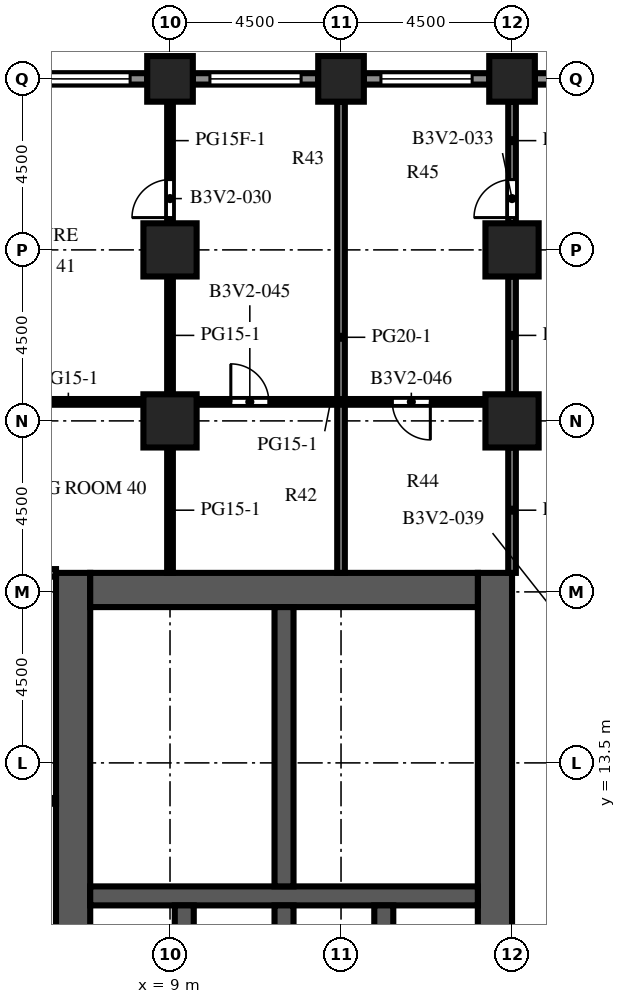
"""IFC4 building model, lengths in metres.
Left out: names, types, materials, properties, quantities, classifications, styles, units other than length and angle.
Written with IfcOpenShell. Run it as: python <this file> out.ifc"""

import sys

from ifc_helpers import new_model, si_unit, direction, frame, frame_2d, origin, origin_2d, place, context, subcontext, project, spatial, rectangle, extrude, element, fill, save


model = new_model("IFC4")
c1 = context("Model", 3, precision=1e-05, world=origin(), true_north=direction((0.0, 1.0)))
c2 = subcontext(c1, "Body", "Model", "MODEL_VIEW")
j1 = project(units=[si_unit("LENGTHUNIT", "METRE"), si_unit("PLANEANGLEUNIT", "RADIAN")], contexts=[c1])
p1 = place(None, origin())
s1 = spatial("IfcSite", under=j1, at=p1, CompositionType="ELEMENT")
p2 = place(p1, origin())
s2 = spatial("IfcBuilding", under=s1, at=p2, CompositionType="ELEMENT")
p3 = place(p2, frame((0.0, 0.0, 102.5)))
s3 = spatial("IfcBuildingStorey", under=s2, at=p3, CompositionType="ELEMENT", Elevation=102.5)
for number, where, z_axis, x_axis in (
    (1, (9.0, 31.5, 0.0), (0.0, 0.0, 1.0), (1.0, 0.0, 0.0)),
    (2, (13.5, 31.5, 0.0), (0.0, 0.0, 1.0), (1.0, 0.0, 0.0)),
    (3, (18.0, 31.5, 0.0), (0.0, 0.0, 1.0), (1.0, 0.0, 0.0)),
):
    element("IfcColumn", number, at=place(p3, frame(where, z_axis=z_axis, x_axis=x_axis)), inside=s3, PredefinedType="COLUMN", context=c2, shape_type="SweptSolid", body=[
        extrude(rectangle(XDim=1.2, YDim=1.2, at=origin_2d()), origin(), (0.0, 0.0, 1.0), 4.1),
    ])
for number, where, z_axis, x_axis in (
    (4, (9.0, 22.5, 0.0), (0.0, 0.0, 1.0), (1.0, 0.0, 0.0)),
    (5, (9.0, 27.0, 0.0), (0.0, 0.0, 1.0), (1.0, 0.0, 0.0)),
    (6, (18.0, 22.5, 0.0), (0.0, 0.0, 1.0), (1.0, 0.0, 0.0)),
    (7, (18.0, 27.0, 0.0), (0.0, 0.0, 1.0), (1.0, 0.0, 0.0)),
):
    element("IfcColumn", number, at=place(p3, frame(where, z_axis=z_axis, x_axis=x_axis)), inside=s3, PredefinedType="COLUMN", context=c2, shape_type="SweptSolid", body=[
        extrude(rectangle(XDim=1.4, YDim=1.4, at=origin_2d()), origin(), (0.0, 0.0, 1.0), 4.1),
    ])
p4 = place(p3, frame((6.45, -9.0, 0.0), z_axis=(0.0, 0.0, 1.0), x_axis=(0.0, 1.0, 0.0)))
e8 = element("IfcWall", 8, at=p4, inside=s3, PredefinedType="SHEAR", context=c2, shape_type="SweptSolid", body=[
    extrude(rectangle(XDim=27.5, YDim=0.9, at=frame_2d((13.75, 0.0))), origin(), (0.0, 0.0, 1.0), 4.1),
])
p5 = place(p4, frame((12.55, 0.0, 0.0)))
e9 = element("IfcOpeningElement", 9, at=p5, cuts=e8, PredefinedType="OPENING", context=c2, shape_type="SweptSolid", body=[
    extrude(rectangle(XDim=2.4, YDim=2.4, at=frame_2d((1.2, 1.2))), frame((0.0, 0.46, 0.0), z_axis=(0.0, -1.0, 0.0), x_axis=(1.0, 0.0, 0.0)), (0.0, 0.0, 1.0), 0.92),
])
p6 = place(p4, frame((3.893, 0.0, 0.0)))
e10 = element("IfcOpeningElement", 10, at=p6, cuts=e8, PredefinedType="OPENING", context=c2, shape_type="SweptSolid", body=[
    extrude(rectangle(XDim=0.923, YDim=2.1, at=frame_2d((0.461, 1.05))), frame((0.0, 0.46, 0.0), z_axis=(0.0, -1.0, 0.0), x_axis=(1.0, 0.0, 0.0)), (0.0, 0.0, 1.0), 0.92),
])
p7 = place(p4, frame((23.427, 0.0, 0.0)))
e11 = element("IfcOpeningElement", 11, at=p7, cuts=e8, PredefinedType="OPENING", context=c2, shape_type="SweptSolid", body=[
    extrude(rectangle(XDim=1.2, YDim=2.1, at=frame_2d((0.6, 1.05))), frame((0.0, 0.46, 0.0), z_axis=(0.0, -1.0, 0.0), x_axis=(1.0, 0.0, 0.0)), (0.0, 0.0, 1.0), 0.92),
])
p8 = place(p3, frame((17.55, -9.0, 0.0), z_axis=(0.0, 0.0, 1.0), x_axis=(0.0, 1.0, 0.0)))
e12 = element("IfcWall", 12, at=p8, inside=s3, PredefinedType="SHEAR", context=c2, shape_type="SweptSolid", body=[
    extrude(rectangle(XDim=27.5, YDim=0.9, at=frame_2d((13.75, 0.0))), origin(), (0.0, 0.0, 1.0), 4.1),
])
p9 = place(p8, frame((12.55, 0.0, 0.0)))
e13 = element("IfcOpeningElement", 13, at=p9, cuts=e12, PredefinedType="OPENING", context=c2, shape_type="SweptSolid", body=[
    extrude(rectangle(XDim=2.4, YDim=2.4, at=frame_2d((1.2, 1.2))), frame((0.0, 0.46, 0.0), z_axis=(0.0, -1.0, 0.0), x_axis=(1.0, 0.0, 0.0)), (0.0, 0.0, 1.0), 0.92),
])
p10 = place(p8, frame((6.825, 0.0, 0.0)))
e14 = element("IfcOpeningElement", 14, at=p10, cuts=e12, PredefinedType="OPENING", context=c2, shape_type="SweptSolid", body=[
    extrude(rectangle(XDim=1.2, YDim=2.1, at=frame_2d((0.6, 1.05))), frame((0.0, 0.46, 0.0), z_axis=(0.0, -1.0, 0.0), x_axis=(1.0, 0.0, 0.0)), (0.0, 0.0, 1.0), 0.92),
])
p11 = place(p8, frame((19.475, 0.0, 0.0)))
e15 = element("IfcOpeningElement", 15, at=p11, cuts=e12, PredefinedType="OPENING", context=c2, shape_type="SweptSolid", body=[
    extrude(rectangle(XDim=1.2, YDim=2.1, at=frame_2d((0.6, 1.05))), frame((0.0, 0.46, 0.0), z_axis=(0.0, -1.0, 0.0), x_axis=(1.0, 0.0, 0.0)), (0.0, 0.0, 1.0), 0.92),
])
p12 = place(p3, frame((6.9, 18.05, 0.0), z_axis=(0.0, 0.0, 1.0), x_axis=(1.0, 0.0, 0.0)))
e16 = element("IfcWall", 16, at=p12, inside=s3, PredefinedType="SHEAR", context=c2, shape_type="SweptSolid", body=[
    extrude(rectangle(XDim=10.2, YDim=0.9, at=frame_2d((5.1, 0.0))), origin(), (0.0, 0.0, 1.0), 4.1),
])
p13 = place(p3, frame((6.9, 10.0, 0.0), z_axis=(0.0, 0.0, 1.0), x_axis=(1.0, 0.0, 0.0)))
e17 = element("IfcWall", 17, at=p13, inside=s3, PredefinedType="SHEAR", context=c2, shape_type="SweptSolid", body=[
    extrude(rectangle(XDim=10.2, YDim=0.5, at=frame_2d((5.1, 0.0))), origin(), (0.0, 0.0, 1.0), 4.1),
])
for number, where, z_axis, x_axis in (
    (18, (9.375, 6.95, 0.0), (0.0, 0.0, 1.0), (0.0, 1.0, 0.0)),
    (19, (12.0, 6.95, 0.0), (0.0, 0.0, 1.0), (0.0, 1.0, 0.0)),
    (20, (14.625, 6.95, 0.0), (0.0, 0.0, 1.0), (0.0, 1.0, 0.0)),
):
    element("IfcWall", number, at=place(p3, frame(where, z_axis=z_axis, x_axis=x_axis)), inside=s3, PredefinedType="SHEAR", context=c2, shape_type="SweptSolid", body=[
        extrude(rectangle(XDim=2.8, YDim=0.5, at=frame_2d((1.4, 0.0))), origin(), (0.0, 0.0, 1.0), 4.1),
    ])
p14 = place(p3, frame((12.0, 10.25, 0.0), z_axis=(0.0, 0.0, 1.0), x_axis=(0.0, 1.0, 0.0)))
e21 = element("IfcWall", 21, at=p14, inside=s3, PredefinedType="SHEAR", context=c2, shape_type="SweptSolid", body=[
    extrude(rectangle(XDim=7.35, YDim=0.5, at=frame_2d((3.675, 0.0))), origin(), (0.0, 0.0, 1.0), 4.1),
])
p15 = place(p3, frame((18.6, 31.5, 0.0), z_axis=(0.0, 0.0, 1.0), x_axis=(1.0, 0.0, 0.0)))
e22 = element("IfcWall", 22, at=p15, inside=s3, PredefinedType="SOLIDWALL", context=c2, shape_type="SweptSolid", body=[
    extrude(rectangle(XDim=3.3, YDim=0.3, at=frame_2d((1.65, 0.0))), origin(), (0.0, 0.0, 1.0), 2.75),
])
p16 = place(p15, frame((1.15, 0.0, 0.0)))
e23 = element("IfcOpeningElement", 23, at=p16, cuts=e22, PredefinedType="OPENING", context=c2, shape_type="SweptSolid", body=[
    extrude(rectangle(XDim=1.0, YDim=2.2, at=frame_2d((0.5, 1.1))), frame((0.0, 0.16, 0.0), z_axis=(0.0, -1.0, 0.0), x_axis=(1.0, 0.0, 0.0)), (0.0, 0.0, 1.0), 0.32),
])
p17 = place(p3, frame((14.1, 31.5, 0.0), z_axis=(0.0, 0.0, 1.0), x_axis=(1.0, 0.0, 0.0)))
e24 = element("IfcWall", 24, at=p17, inside=s3, PredefinedType="SOLIDWALL", context=c2, shape_type="SweptSolid", body=[
    extrude(rectangle(XDim=3.3, YDim=0.3, at=frame_2d((1.65, 0.0))), origin(), (0.0, 0.0, 1.0), 2.75),
])
p18 = place(p17, frame((0.45, 0.0, 0.8)))
e25 = element("IfcOpeningElement", 25, at=p18, cuts=e24, PredefinedType="OPENING", context=c2, shape_type="SweptSolid", body=[
    extrude(rectangle(XDim=2.4, YDim=1.7, at=frame_2d((1.2, 0.85))), frame((0.0, 0.16, 0.0), z_axis=(0.0, -1.0, 0.0), x_axis=(1.0, 0.0, 0.0)), (0.0, 0.0, 1.0), 0.32),
])
p19 = place(p3, frame((9.6, 31.5, 0.0), z_axis=(0.0, 0.0, 1.0), x_axis=(1.0, 0.0, 0.0)))
e26 = element("IfcWall", 26, at=p19, inside=s3, PredefinedType="SOLIDWALL", context=c2, shape_type="SweptSolid", body=[
    extrude(rectangle(XDim=3.3, YDim=0.3, at=frame_2d((1.65, 0.0))), origin(), (0.0, 0.0, 1.0), 2.75),
])
p20 = place(p19, frame((0.45, 0.0, 0.8)))
e27 = element("IfcOpeningElement", 27, at=p20, cuts=e26, PredefinedType="OPENING", context=c2, shape_type="SweptSolid", body=[
    extrude(rectangle(XDim=2.4, YDim=1.7, at=frame_2d((1.2, 0.85))), frame((0.0, 0.16, 0.0), z_axis=(0.0, -1.0, 0.0), x_axis=(1.0, 0.0, 0.0)), (0.0, 0.0, 1.0), 0.32),
])
p21 = place(p3, frame((5.1, 31.5, 0.0), z_axis=(0.0, 0.0, 1.0), x_axis=(1.0, 0.0, 0.0)))
e28 = element("IfcWall", 28, at=p21, inside=s3, PredefinedType="SOLIDWALL", context=c2, shape_type="SweptSolid", body=[
    extrude(rectangle(XDim=3.3, YDim=0.3, at=frame_2d((1.65, 0.0))), origin(), (0.0, 0.0, 1.0), 2.75),
])
p22 = place(p21, frame((0.45, 0.0, 0.8)))
e29 = element("IfcOpeningElement", 29, at=p22, cuts=e28, PredefinedType="OPENING", context=c2, shape_type="SweptSolid", body=[
    extrude(rectangle(XDim=2.4, YDim=1.7, at=frame_2d((1.2, 0.85))), frame((0.0, 0.16, 0.0), z_axis=(0.0, -1.0, 0.0), x_axis=(1.0, 0.0, 0.0)), (0.0, 0.0, 1.0), 0.32),
])
p23 = place(p3, frame((6.9, 12.455, 0.0), z_axis=(0.0, 0.0, 1.0), x_axis=(1.0, 0.0, 0.0)))
e30 = element("IfcWall", 30, at=p23, inside=s3, PredefinedType="PARTITIONING", context=c2, shape_type="SweptSolid", body=[
    extrude(rectangle(XDim=1.3, YDim=0.1, at=frame_2d((0.65, 0.0))), origin(), (0.0, 0.0, 1.0), 3.65),
])
p24 = place(p23, frame((0.2, 0.0, 0.0)))
e31 = element("IfcOpeningElement", 31, at=p24, cuts=e30, PredefinedType="OPENING", context=c2, shape_type="SweptSolid", body=[
    extrude(rectangle(XDim=0.9, YDim=2.1, at=frame_2d((0.45, 1.05))), frame((0.0, 0.06, 0.0), z_axis=(0.0, -1.0, 0.0), x_axis=(1.0, 0.0, 0.0)), (0.0, 0.0, 1.0), 0.12),
])
p25 = place(p3, frame((8.2, 12.455, 0.0), z_axis=(0.0, 0.0, 1.0), x_axis=(1.0, 0.0, 0.0)))
e32 = element("IfcWall", 32, at=p25, inside=s3, PredefinedType="PARTITIONING", context=c2, shape_type="SweptSolid", body=[
    extrude(rectangle(XDim=3.55, YDim=0.1, at=frame_2d((1.775, 0.0))), origin(), (0.0, 0.0, 1.0), 3.65),
])
p26 = place(p3, frame((8.2, 12.455, 0.0), z_axis=(0.0, 0.0, 1.0), x_axis=(0.0, 1.0, 0.0)))
e33 = element("IfcWall", 33, at=p26, inside=s3, PredefinedType="PARTITIONING", context=c2, shape_type="SweptSolid", body=[
    extrude(rectangle(XDim=2.573, YDim=0.1, at=frame_2d((1.286, 0.0))), origin(), (0.0, 0.0, 1.0), 3.65),
])
p27 = place(p26, frame((0.786, 0.0, 0.0)))
e34 = element("IfcOpeningElement", 34, at=p27, cuts=e33, PredefinedType="OPENING", context=c2, shape_type="SweptSolid", body=[
    extrude(rectangle(XDim=1.0, YDim=2.1, at=frame_2d((0.5, 1.05))), frame((0.0, 0.06, 0.0), z_axis=(0.0, -1.0, 0.0), x_axis=(1.0, 0.0, 0.0)), (0.0, 0.0, 1.0), 0.12),
])
p28 = place(p3, frame((8.2, 15.028, 0.0), z_axis=(0.0, 0.0, 1.0), x_axis=(0.0, 1.0, 0.0)))
e35 = element("IfcWall", 35, at=p28, inside=s3, PredefinedType="PARTITIONING", context=c2, shape_type="SweptSolid", body=[
    extrude(rectangle(XDim=2.573, YDim=0.1, at=frame_2d((1.286, 0.0))), origin(), (0.0, 0.0, 1.0), 3.65),
])
p29 = place(p28, frame((0.786, 0.0, 0.0)))
e36 = element("IfcOpeningElement", 36, at=p29, cuts=e35, PredefinedType="OPENING", context=c2, shape_type="SweptSolid", body=[
    extrude(rectangle(XDim=1.0, YDim=2.1, at=frame_2d((0.5, 1.05))), frame((0.0, 0.06, 0.0), z_axis=(0.0, -1.0, 0.0), x_axis=(1.0, 0.0, 0.0)), (0.0, 0.0, 1.0), 0.12),
])
p30 = place(p3, frame((8.2, 15.028, 0.0), z_axis=(0.0, 0.0, 1.0), x_axis=(1.0, 0.0, 0.0)))
e37 = element("IfcWall", 37, at=p30, inside=s3, PredefinedType="PARTITIONING", context=c2, shape_type="SweptSolid", body=[
    extrude(rectangle(XDim=3.55, YDim=0.1, at=frame_2d((1.775, 0.0))), origin(), (0.0, 0.0, 1.0), 3.65),
])
p31 = place(p3, frame((9.0, 18.5, 0.0), z_axis=(0.0, 0.0, 1.0), x_axis=(0.0, 1.0, 0.0)))
e38 = element("IfcWall", 38, at=p31, inside=s3, PredefinedType="PARTITIONING", context=c2, shape_type="SweptSolid", body=[
    extrude(rectangle(XDim=3.3, YDim=0.15, at=frame_2d((1.65, 0.0))), origin(), (0.0, 0.0, 1.0), 3.65),
])
p32 = place(p3, frame((9.0, 23.2, 0.0), z_axis=(0.0, 0.0, 1.0), x_axis=(0.0, 1.0, 0.0)))
e39 = element("IfcWall", 39, at=p32, inside=s3, PredefinedType="PARTITIONING", context=c2, shape_type="SweptSolid", body=[
    extrude(rectangle(XDim=3.1, YDim=0.15, at=frame_2d((1.55, 0.0))), origin(), (0.0, 0.0, 1.0), 3.65),
])
p33 = place(p3, frame((9.0, 30.9, 0.0), z_axis=(0.0, 0.0, 1.0), x_axis=(0.0, -1.0, 0.0)))
e40 = element("IfcWall", 40, at=p33, inside=s3, PredefinedType="PARTITIONING", context=c2, shape_type="SweptSolid", body=[
    extrude(rectangle(XDim=3.2, YDim=0.15, at=frame_2d((1.6, 0.0))), origin(), (0.0, 0.0, 1.0), 3.65),
])
p34 = place(p33, frame((2.05, 0.0, 0.0)))
e41 = element("IfcOpeningElement", 41, at=p34, cuts=e40, PredefinedType="OPENING", context=c2, shape_type="SweptSolid", body=[
    extrude(rectangle(XDim=1.0, YDim=2.1, at=frame_2d((0.5, 1.05))), frame((0.0, 0.085, 0.0), z_axis=(0.0, -1.0, 0.0), x_axis=(1.0, 0.0, 0.0)), (0.0, 0.0, 1.0), 0.17),
])
p35 = place(p3, frame((13.5, 18.5, 0.0), z_axis=(0.0, 0.0, 1.0), x_axis=(0.0, 1.0, 0.0)))
e42 = element("IfcWall", 42, at=p35, inside=s3, PredefinedType="PARTITIONING", context=c2, shape_type="SweptSolid", body=[
    extrude(rectangle(XDim=12.4, YDim=0.2, at=frame_2d((6.2, 0.0))), origin(), (0.0, 0.0, 1.0), 3.65),
])
p36 = place(p3, frame((18.0, 18.5, 0.0), z_axis=(0.0, 0.0, 1.0), x_axis=(0.0, 1.0, 0.0)))
e43 = element("IfcWall", 43, at=p36, inside=s3, PredefinedType="PARTITIONING", context=c2, shape_type="SweptSolid", body=[
    extrude(rectangle(XDim=3.3, YDim=0.2, at=frame_2d((1.65, 0.0))), origin(), (0.0, 0.0, 1.0), 3.65),
])
p37 = place(p3, frame((18.0, 23.2, 0.0), z_axis=(0.0, 0.0, 1.0), x_axis=(0.0, 1.0, 0.0)))
e44 = element("IfcWall", 44, at=p37, inside=s3, PredefinedType="PARTITIONING", context=c2, shape_type="SweptSolid", body=[
    extrude(rectangle(XDim=3.1, YDim=0.2, at=frame_2d((1.55, 0.0))), origin(), (0.0, 0.0, 1.0), 3.65),
])
p38 = place(p3, frame((18.0, 27.7, 0.0), z_axis=(0.0, 0.0, 1.0), x_axis=(0.0, 1.0, 0.0)))
e45 = element("IfcWall", 45, at=p38, inside=s3, PredefinedType="PARTITIONING", context=c2, shape_type="SweptSolid", body=[
    extrude(rectangle(XDim=3.2, YDim=0.2, at=frame_2d((1.6, 0.0))), origin(), (0.0, 0.0, 1.0), 3.65),
])
p39 = place(p38, frame((0.15, 0.0, 0.0)))
e46 = element("IfcOpeningElement", 46, at=p39, cuts=e45, PredefinedType="OPENING", context=c2, shape_type="SweptSolid", body=[
    extrude(rectangle(XDim=1.0, YDim=2.1, at=frame_2d((0.5, 1.05))), frame((0.0, 0.11, 0.0), z_axis=(0.0, -1.0, 0.0), x_axis=(1.0, 0.0, 0.0)), (0.0, 0.0, 1.0), 0.22),
])
p40 = place(p3, frame((1.5, 12.5, 0.0), z_axis=(0.0, 0.0, 1.0), x_axis=(1.0, 0.0, 0.0)))
e47 = element("IfcWall", 47, at=p40, inside=s3, PredefinedType="PARTITIONING", context=c2, shape_type="SweptSolid", body=[
    extrude(rectangle(XDim=4.5, YDim=0.15, at=frame_2d((2.25, 0.0))), origin(), (0.0, 0.0, 1.0), 3.65),
])
p41 = place(p40, frame((1.85, 0.0, 0.0)))
e48 = element("IfcOpeningElement", 48, at=p41, cuts=e47, PredefinedType="OPENING", context=c2, shape_type="SweptSolid", body=[
    extrude(rectangle(XDim=1.0, YDim=2.1, at=frame_2d((0.5, 1.05))), frame((0.0, 0.085, 0.0), z_axis=(0.0, -1.0, 0.0), x_axis=(1.0, 0.0, 0.0)), (0.0, 0.0, 1.0), 0.17),
])
p42 = place(p3, frame((1.5, 18.5, 0.0), z_axis=(0.0, 0.0, 1.0), x_axis=(1.0, 0.0, 0.0)))
e49 = element("IfcWall", 49, at=p42, inside=s3, PredefinedType="PARTITIONING", context=c2, shape_type="SweptSolid", body=[
    extrude(rectangle(XDim=4.5, YDim=0.2, at=frame_2d((2.25, 0.0))), origin(), (0.0, 0.0, 1.0), 3.65),
])
p43 = place(p3, frame((8.3, 23.0, 0.0), z_axis=(0.0, 0.0, 1.0), x_axis=(-1.0, 0.0, 0.0)))
e50 = element("IfcWall", 50, at=p43, inside=s3, PredefinedType="PARTITIONING", context=c2, shape_type="SweptSolid", body=[
    extrude(rectangle(XDim=7.6, YDim=0.15, at=frame_2d((3.8, 0.0))), origin(), (0.0, 0.0, 1.0), 3.65),
])
p44 = place(p43, frame((3.95, 0.0, 0.0)))
e51 = element("IfcOpeningElement", 51, at=p44, cuts=e50, PredefinedType="OPENING", context=c2, shape_type="SweptSolid", body=[
    extrude(rectangle(XDim=1.0, YDim=2.1, at=frame_2d((0.5, 1.05))), frame((0.0, 0.085, 0.0), z_axis=(0.0, -1.0, 0.0), x_axis=(1.0, 0.0, 0.0)), (0.0, 0.0, 1.0), 0.17),
])
p45 = place(p3, frame((17.3, 23.0, 0.0), z_axis=(0.0, 0.0, 1.0), x_axis=(-1.0, 0.0, 0.0)))
e52 = element("IfcWall", 52, at=p45, inside=s3, PredefinedType="PARTITIONING", context=c2, shape_type="SweptSolid", body=[
    extrude(rectangle(XDim=7.6, YDim=0.15, at=frame_2d((3.8, 0.0))), origin(), (0.0, 0.0, 1.0), 3.65),
])
p46 = place(p45, frame((5.7, 0.0, 0.0)))
e53 = element("IfcOpeningElement", 53, at=p46, cuts=e52, PredefinedType="OPENING", context=c2, shape_type="SweptSolid", body=[
    extrude(rectangle(XDim=1.0, YDim=2.1, at=frame_2d((0.5, 1.05))), frame((0.0, 0.085, 0.0), z_axis=(0.0, -1.0, 0.0), x_axis=(1.0, 0.0, 0.0)), (0.0, 0.0, 1.0), 0.17),
])
p47 = place(p45, frame((1.45, 0.0, 0.0)))
e54 = element("IfcOpeningElement", 54, at=p47, cuts=e52, PredefinedType="OPENING", context=c2, shape_type="SweptSolid", body=[
    extrude(rectangle(XDim=1.0, YDim=2.1, at=frame_2d((0.5, 1.05))), frame((0.0, 0.085, 0.0), z_axis=(0.0, -1.0, 0.0), x_axis=(1.0, 0.0, 0.0)), (0.0, 0.0, 1.0), 0.17),
])
p48 = place(p18, origin())
e55 = element("IfcWindow", 55, at=p48, inside=s3, PartitioningType="SINGLE_PANEL", PredefinedType="WINDOW", context=c2, shape_type="SweptSolid", body=[
    extrude(rectangle(XDim=2.4, YDim=1.7, at=frame_2d((1.2, 0.85))), frame((0.0, 0.03, 0.0), z_axis=(0.0, -1.0, 0.0), x_axis=(1.0, 0.0, 0.0)), (0.0, 0.0, 1.0), 0.06),
])
fill(e25, e55)
p49 = place(p20, origin())
e56 = element("IfcWindow", 56, at=p49, inside=s3, PartitioningType="SINGLE_PANEL", PredefinedType="WINDOW", context=c2, shape_type="SweptSolid", body=[
    extrude(rectangle(XDim=2.4, YDim=1.7, at=frame_2d((1.2, 0.85))), frame((0.0, 0.03, 0.0), z_axis=(0.0, -1.0, 0.0), x_axis=(1.0, 0.0, 0.0)), (0.0, 0.0, 1.0), 0.06),
])
fill(e27, e56)
p50 = place(p22, origin())
e57 = element("IfcWindow", 57, at=p50, inside=s3, PartitioningType="SINGLE_PANEL", PredefinedType="WINDOW", context=c2, shape_type="SweptSolid", body=[
    extrude(rectangle(XDim=2.4, YDim=1.7, at=frame_2d((1.2, 0.85))), frame((0.0, 0.03, 0.0), z_axis=(0.0, -1.0, 0.0), x_axis=(1.0, 0.0, 0.0)), (0.0, 0.0, 1.0), 0.06),
])
fill(e29, e57)
p51 = place(p11, frame((1.2, 0.0, 0.0), z_axis=(0.0, 0.0, 1.0), x_axis=(-1.0, 0.0, 0.0)))
e58 = element("IfcDoor", 58, at=p51, inside=s3, OperationType="SINGLE_SWING_LEFT", PredefinedType="DOOR", context=c2, shape_type="SweptSolid", body=[
    extrude(rectangle(XDim=1.2, YDim=2.1, at=frame_2d((0.6, 1.05))), frame((0.0, 0.025, 0.0), z_axis=(0.0, -1.0, 0.0), x_axis=(1.0, 0.0, 0.0)), (0.0, 0.0, 1.0), 0.05),
])
fill(e15, e58)
p52 = place(p24, origin())
e59 = element("IfcDoor", 59, at=p52, inside=s3, OperationType="SINGLE_SWING_RIGHT", PredefinedType="DOOR", context=c2, shape_type="SweptSolid", body=[
    extrude(rectangle(XDim=0.9, YDim=2.1, at=frame_2d((0.45, 1.05))), frame((0.0, 0.025, 0.0), z_axis=(0.0, -1.0, 0.0), x_axis=(1.0, 0.0, 0.0)), (0.0, 0.0, 1.0), 0.05),
])
fill(e31, e59)
p53 = place(p7, origin())
e60 = element("IfcDoor", 60, at=p53, inside=s3, OperationType="SINGLE_SWING_LEFT", PredefinedType="DOOR", context=c2, shape_type="SweptSolid", body=[
    extrude(rectangle(XDim=1.2, YDim=2.1, at=frame_2d((0.6, 1.05))), frame((0.0, -0.375, 0.0), z_axis=(0.0, -1.0, 0.0), x_axis=(1.0, 0.0, 0.0)), (0.0, 0.0, 1.0), 0.05),
])
fill(e11, e60)
p54 = place(p27, origin())
e61 = element("IfcDoor", 61, at=p54, inside=s3, OperationType="SINGLE_SWING_RIGHT", PredefinedType="DOOR", context=c2, shape_type="SweptSolid", body=[
    extrude(rectangle(XDim=1.0, YDim=2.1, at=frame_2d((0.5, 1.05))), frame((0.0, 0.025, 0.0), z_axis=(0.0, -1.0, 0.0), x_axis=(1.0, 0.0, 0.0)), (0.0, 0.0, 1.0), 0.05),
])
fill(e34, e61)
p55 = place(p29, origin())
e62 = element("IfcDoor", 62, at=p55, inside=s3, OperationType="SINGLE_SWING_LEFT", PredefinedType="DOOR", context=c2, shape_type="SweptSolid", body=[
    extrude(rectangle(XDim=1.0, YDim=2.1, at=frame_2d((0.5, 1.05))), frame((0.0, 0.025, 0.0), z_axis=(0.0, -1.0, 0.0), x_axis=(1.0, 0.0, 0.0)), (0.0, 0.0, 1.0), 0.05),
])
fill(e36, e62)
p56 = place(p34, origin())
e63 = element("IfcDoor", 63, at=p56, inside=s3, OperationType="SINGLE_SWING_RIGHT", PredefinedType="DOOR", context=c2, shape_type="SweptSolid", body=[
    extrude(rectangle(XDim=1.0, YDim=2.1, at=frame_2d((0.5, 1.05))), frame((0.0, 0.025, 0.0), z_axis=(0.0, -1.0, 0.0), x_axis=(1.0, 0.0, 0.0)), (0.0, 0.0, 1.0), 0.05),
])
fill(e41, e63)
p57 = place(p39, origin())
e64 = element("IfcDoor", 64, at=p57, inside=s3, OperationType="SINGLE_SWING_LEFT", PredefinedType="DOOR", context=c2, shape_type="SweptSolid", body=[
    extrude(rectangle(XDim=1.0, YDim=2.1, at=frame_2d((0.5, 1.05))), frame((0.0, 0.025, 0.0), z_axis=(0.0, -1.0, 0.0), x_axis=(1.0, 0.0, 0.0)), (0.0, 0.0, 1.0), 0.05),
])
fill(e46, e64)
p58 = place(p46, origin())
e65 = element("IfcDoor", 65, at=p58, inside=s3, OperationType="SINGLE_SWING_RIGHT", PredefinedType="DOOR", context=c2, shape_type="SweptSolid", body=[
    extrude(rectangle(XDim=1.0, YDim=2.1, at=frame_2d((0.5, 1.05))), frame((0.0, 0.025, 0.0), z_axis=(0.0, -1.0, 0.0), x_axis=(1.0, 0.0, 0.0)), (0.0, 0.0, 1.0), 0.05),
])
fill(e53, e65)
p59 = place(p47, origin())
e66 = element("IfcDoor", 66, at=p59, inside=s3, OperationType="SINGLE_SWING_LEFT", PredefinedType="DOOR", context=c2, shape_type="SweptSolid", body=[
    extrude(rectangle(XDim=1.0, YDim=2.1, at=frame_2d((0.5, 1.05))), frame((0.0, 0.025, 0.0), z_axis=(0.0, -1.0, 0.0), x_axis=(1.0, 0.0, 0.0)), (0.0, 0.0, 1.0), 0.05),
])
fill(e54, e66)
save(model, sys.argv[1])
